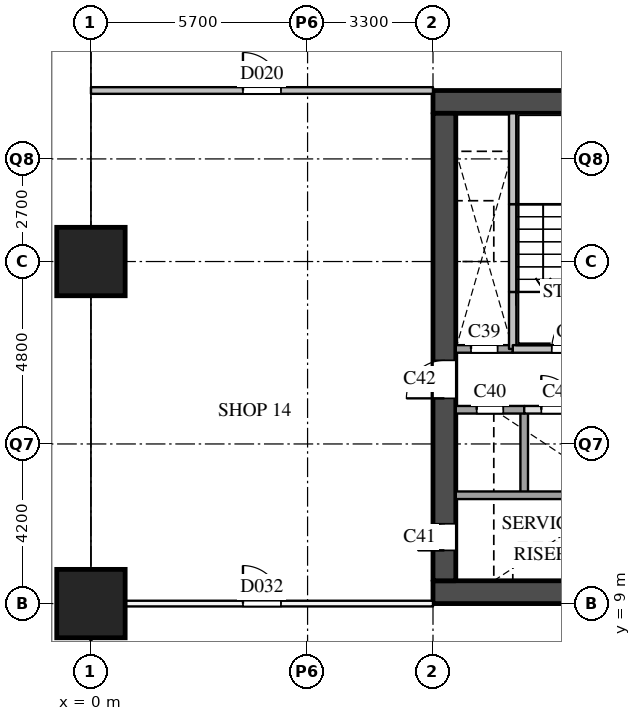
"""IFC4 building model, lengths in metres.
Left out: names, types, materials, properties, quantities, classifications, styles, units other than length and angle.
Written with IfcOpenShell. Run it as: python <this file> out.ifc"""

import sys

from ifc_helpers import new_model, si_unit, direction, frame, frame_2d, origin, origin_2d, place, context, subcontext, project, spatial, rectangle, extrude, element, fill, save


model = new_model("IFC4")
c1 = context("Model", 3, precision=1e-05, world=origin(), true_north=direction((0.0, 1.0)))
c2 = subcontext(c1, "Body", "Model", "MODEL_VIEW")
j1 = project(units=[si_unit("LENGTHUNIT", "METRE"), si_unit("PLANEANGLEUNIT", "RADIAN")], contexts=[c1])
p1 = place(None, origin())
s1 = spatial("IfcSite", under=j1, at=p1, CompositionType="ELEMENT")
p2 = place(p1, origin())
s2 = spatial("IfcBuilding", under=s1, at=p2, CompositionType="ELEMENT")
p3 = place(p2, frame((0.0, 0.0, 21.0)))
s3 = spatial("IfcBuildingStorey", under=s2, at=p3, CompositionType="ELEMENT", Elevation=21.0)
for number, where, z_axis, x_axis in (
    (1, (0.0, 9.0, 0.0), (0.0, 0.0, 1.0), (1.0, 0.0, 0.0)),
    (2, (0.0, 18.0, 0.0), (0.0, 0.0, 1.0), (1.0, 0.0, 0.0)),
):
    element("IfcColumn", number, at=place(p3, frame(where, z_axis=z_axis, x_axis=x_axis)), inside=s3, PredefinedType="COLUMN", context=c2, shape_type="SweptSolid", body=[
        extrude(rectangle(XDim=1.8, YDim=1.8, at=origin_2d()), origin(), (0.0, 0.0, 1.0), 5.0),
    ])
for number, where, z_axis, x_axis in (
    (3, (9.0, 9.3, 0.0), (0.0, 0.0, 1.0), (1.0, 0.0, 0.0)),
    (4, (9.0, 22.2, 0.0), (0.0, 0.0, 1.0), (1.0, 0.0, 0.0)),
):
    element("IfcWall", number, at=place(p3, frame(where, z_axis=z_axis, x_axis=x_axis)), inside=s3, PredefinedType="SHEAR", context=c2, shape_type="SweptSolid", body=[
        extrude(rectangle(XDim=9.0, YDim=0.6, at=frame_2d((4.5, 0.0))), origin(), (0.0, 0.0, 1.0), 4.55),
    ])
p4 = place(p3, frame((9.3, 9.6, 0.0), z_axis=(0.0, 0.0, 1.0), x_axis=(0.0, 1.0, 0.0)))
e5 = element("IfcWall", 5, at=p4, inside=s3, PredefinedType="SHEAR", context=c2, shape_type="SweptSolid", body=[
    extrude(rectangle(XDim=12.3, YDim=0.6, at=frame_2d((6.15, 0.0))), origin(), (0.0, 0.0, 1.0), 4.55),
])
p5 = place(p4, frame((0.8, 0.0, 0.0)))
e6 = element("IfcOpeningElement", 6, at=p5, cuts=e5, PredefinedType="OPENING", context=c2, shape_type="SweptSolid", body=[
    extrude(rectangle(XDim=0.7, YDim=2.1, at=frame_2d((0.35, 1.05))), frame((0.0, 0.31, 0.0), z_axis=(0.0, -1.0, 0.0), x_axis=(1.0, 0.0, 0.0)), (0.0, 0.0, 1.0), 0.62),
])
p6 = place(p4, frame((4.8, 0.0, 0.0)))
e7 = element("IfcOpeningElement", 7, at=p6, cuts=e5, PredefinedType="OPENING", context=c2, shape_type="SweptSolid", body=[
    extrude(rectangle(XDim=1.0, YDim=2.1, at=frame_2d((0.5, 1.05))), frame((0.0, 0.31, 0.0), z_axis=(0.0, -1.0, 0.0), x_axis=(1.0, 0.0, 0.0)), (0.0, 0.0, 1.0), 0.62),
])
p7 = place(p3, frame((11.1, 15.7, 0.0), z_axis=(0.0, 0.0, 1.0), x_axis=(0.0, 1.0, 0.0)))
e8 = element("IfcWall", 8, at=p7, inside=s3, PredefinedType="SOLIDWALL", context=c2, shape_type="SweptSolid", body=[
    extrude(rectangle(XDim=1.5, YDim=0.2, at=frame_2d((0.75, 0.0))), origin(), (0.0, 0.0, 1.0), 4.55),
])
p8 = place(p3, frame((11.1, 17.2, 0.0), z_axis=(0.0, 0.0, 1.0), x_axis=(0.0, 1.0, 0.0)))
e9 = element("IfcWall", 9, at=p8, inside=s3, PredefinedType="SOLIDWALL", context=c2, shape_type="SweptSolid", body=[
    extrude(rectangle(XDim=2.31, YDim=0.2, at=frame_2d((1.155, 0.0))), origin(), (0.0, 0.0, 1.0), 4.55),
])
p9 = place(p3, frame((11.1, 19.51, 0.0), z_axis=(0.0, 0.0, 1.0), x_axis=(0.0, 1.0, 0.0)))
e10 = element("IfcWall", 10, at=p9, inside=s3, PredefinedType="SOLIDWALL", context=c2, shape_type="SweptSolid", body=[
    extrude(rectangle(XDim=2.39, YDim=0.2, at=frame_2d((1.195, 0.0))), origin(), (0.0, 0.0, 1.0), 4.55),
])
p10 = place(p3, frame((11.4, 11.9, 0.0), z_axis=(0.0, 0.0, 1.0), x_axis=(0.0, 1.0, 0.0)))
e11 = element("IfcWall", 11, at=p10, inside=s3, PredefinedType="SOLIDWALL", context=c2, shape_type="SweptSolid", body=[
    extrude(rectangle(XDim=2.2, YDim=0.2, at=frame_2d((1.1, 0.0))), origin(), (0.0, 0.0, 1.0), 4.55),
])
p11 = place(p3, frame((9.6, 11.85, 0.0), z_axis=(0.0, 0.0, 1.0), x_axis=(1.0, 0.0, 0.0)))
e12 = element("IfcWall", 12, at=p11, inside=s3, PredefinedType="SOLIDWALL", context=c2, shape_type="SweptSolid", body=[
    extrude(rectangle(XDim=7.8, YDim=0.2, at=frame_2d((3.9, 0.0))), origin(), (0.0, 0.0, 1.0), 4.55),
])
p12 = place(p3, frame((11.4, 14.1, 0.0), z_axis=(0.0, 0.0, 1.0), x_axis=(1.0, 0.0, 0.0)))
e13 = element("IfcWall", 13, at=p12, inside=s3, PredefinedType="PARTITIONING", context=c2, shape_type="SweptSolid", body=[
    extrude(rectangle(XDim=6.0, YDim=0.2, at=frame_2d((3.0, 0.0))), origin(), (0.0, 0.0, 1.0), 4.55),
])
p13 = place(p12, frame((0.45, 0.0, 0.0)))
e14 = element("IfcOpeningElement", 14, at=p13, cuts=e13, PredefinedType="OPENING", context=c2, shape_type="SweptSolid", body=[
    extrude(rectangle(XDim=0.9, YDim=2.1, at=frame_2d((0.45, 1.05))), frame((0.0, 0.11, 0.0), z_axis=(0.0, -1.0, 0.0), x_axis=(1.0, 0.0, 0.0)), (0.0, 0.0, 1.0), 0.22),
])
p14 = place(p12, frame((3.45, 0.0, 0.0)))
e15 = element("IfcOpeningElement", 15, at=p14, cuts=e13, PredefinedType="OPENING", context=c2, shape_type="SweptSolid", body=[
    extrude(rectangle(XDim=0.9, YDim=2.1, at=frame_2d((0.45, 1.05))), frame((0.0, 0.11, 0.0), z_axis=(0.0, -1.0, 0.0), x_axis=(1.0, 0.0, 0.0)), (0.0, 0.0, 1.0), 0.22),
])
p15 = place(p3, frame((9.6, 14.1, 0.0), z_axis=(0.0, 0.0, 1.0), x_axis=(1.0, 0.0, 0.0)))
e16 = element("IfcWall", 16, at=p15, inside=s3, PredefinedType="SOLIDWALL", context=c2, shape_type="SweptSolid", body=[
    extrude(rectangle(XDim=1.8, YDim=0.2, at=frame_2d((0.9, 0.0))), origin(), (0.0, 0.0, 1.0), 4.55),
])
p16 = place(p15, frame((0.55, 0.0, 0.0)))
e17 = element("IfcOpeningElement", 17, at=p16, cuts=e16, PredefinedType="OPENING", context=c2, shape_type="SweptSolid", body=[
    extrude(rectangle(XDim=0.7, YDim=2.1, at=frame_2d((0.35, 1.05))), frame((0.0, 0.11, 0.0), z_axis=(0.0, -1.0, 0.0), x_axis=(1.0, 0.0, 0.0)), (0.0, 0.0, 1.0), 0.22),
])
p17 = place(p3, frame((9.6, 15.7, 0.0), z_axis=(0.0, 0.0, 1.0), x_axis=(1.0, 0.0, 0.0)))
e18 = element("IfcWall", 18, at=p17, inside=s3, PredefinedType="SOLIDWALL", context=c2, shape_type="SweptSolid", body=[
    extrude(rectangle(XDim=1.5, YDim=0.2, at=frame_2d((0.75, 0.0))), origin(), (0.0, 0.0, 1.0), 4.55),
])
p18 = place(p17, frame((0.4, 0.0, 0.0)))
e19 = element("IfcOpeningElement", 19, at=p18, cuts=e18, PredefinedType="OPENING", context=c2, shape_type="SweptSolid", body=[
    extrude(rectangle(XDim=0.7, YDim=2.1, at=frame_2d((0.35, 1.05))), frame((0.0, 0.11, 0.0), z_axis=(0.0, -1.0, 0.0), x_axis=(1.0, 0.0, 0.0)), (0.0, 0.0, 1.0), 0.22),
])
p19 = place(p3, frame((11.1, 15.7, 0.0), z_axis=(0.0, 0.0, 1.0), x_axis=(1.0, 0.0, 0.0)))
e20 = element("IfcWall", 20, at=p19, inside=s3, PredefinedType="SOLIDWALL", context=c2, shape_type="SweptSolid", body=[
    extrude(rectangle(XDim=3.05, YDim=0.2, at=frame_2d((1.525, 0.0))), origin(), (0.0, 0.0, 1.0), 4.55),
])
p20 = place(p19, frame((1.025, 0.0, 0.0)))
e21 = element("IfcOpeningElement", 21, at=p20, cuts=e20, PredefinedType="OPENING", context=c2, shape_type="SweptSolid", body=[
    extrude(rectangle(XDim=1.1, YDim=2.1, at=frame_2d((0.55, 1.05))), frame((0.0, 0.11, 0.0), z_axis=(0.0, -1.0, 0.0), x_axis=(1.0, 0.0, 0.0)), (0.0, 0.0, 1.0), 0.22),
])
p21 = place(p3, frame((0.0, 22.5, 0.0), z_axis=(0.0, 0.0, 1.0), x_axis=(1.0, 0.0, 0.0)))
e22 = element("IfcWall", 22, at=p21, inside=s3, PredefinedType="PARTITIONING", context=c2, shape_type="SweptSolid", body=[
    extrude(rectangle(XDim=9.0, YDim=0.175, at=frame_2d((4.5, 0.0))), origin(), (0.0, 0.0, 1.0), 3.55),
])
p22 = place(p21, frame((4.0, 0.0, 0.0)))
e23 = element("IfcOpeningElement", 23, at=p22, cuts=e22, PredefinedType="OPENING", context=c2, shape_type="SweptSolid", body=[
    extrude(rectangle(XDim=1.0, YDim=2.1, at=frame_2d((0.5, 1.05))), frame((0.0, 0.097, 0.0), z_axis=(0.0, -1.0, 0.0), x_axis=(1.0, 0.0, 0.0)), (0.0, 0.0, 1.0), 0.195),
])
p23 = place(p3, frame((0.0, 9.0, 0.0), z_axis=(0.0, 0.0, 1.0), x_axis=(1.0, 0.0, 0.0)))
e24 = element("IfcWall", 24, at=p23, inside=s3, PredefinedType="PARTITIONING", context=c2, shape_type="SweptSolid", body=[
    extrude(rectangle(XDim=9.0, YDim=0.15, at=frame_2d((4.5, 0.0))), origin(), (0.0, 0.0, 1.0), 4.55),
])
p24 = place(p23, frame((4.0, 0.0, 0.0)))
e25 = element("IfcOpeningElement", 25, at=p24, cuts=e24, PredefinedType="OPENING", context=c2, shape_type="SweptSolid", body=[
    extrude(rectangle(XDim=1.0, YDim=2.1, at=frame_2d((0.5, 1.05))), frame((0.0, 0.085, 0.0), z_axis=(0.0, -1.0, 0.0), x_axis=(1.0, 0.0, 0.0)), (0.0, 0.0, 1.0), 0.17),
])
p25 = place(p20, origin())
e26 = element("IfcDoor", 26, at=p25, inside=s3, OperationType="SINGLE_SWING_RIGHT", PredefinedType="DOOR", context=c2, shape_type="SweptSolid", body=[
    extrude(rectangle(XDim=1.1, YDim=2.1, at=frame_2d((0.55, 1.05))), frame((0.0, 0.025, 0.0), z_axis=(0.0, -1.0, 0.0), x_axis=(1.0, 0.0, 0.0)), (0.0, 0.0, 1.0), 0.05),
])
fill(e21, e26)
p26 = place(p18, origin())
e27 = element("IfcDoor", 27, at=p26, inside=s3, OperationType="SINGLE_SWING_LEFT", PredefinedType="DOOR", context=c2, shape_type="SweptSolid", body=[
    extrude(rectangle(XDim=0.7, YDim=2.1, at=frame_2d((0.35, 1.05))), frame((0.0, 0.025, 0.0), z_axis=(0.0, -1.0, 0.0), x_axis=(1.0, 0.0, 0.0)), (0.0, 0.0, 1.0), 0.05),
])
fill(e19, e27)
p27 = place(p16, origin())
e28 = element("IfcDoor", 28, at=p27, inside=s3, OperationType="SINGLE_SWING_LEFT", PredefinedType="DOOR", context=c2, shape_type="SweptSolid", body=[
    extrude(rectangle(XDim=0.7, YDim=2.1, at=frame_2d((0.35, 1.05))), frame((0.0, 0.025, 0.0), z_axis=(0.0, -1.0, 0.0), x_axis=(1.0, 0.0, 0.0)), (0.0, 0.0, 1.0), 0.05),
])
fill(e17, e28)
p28 = place(p5, origin())
e29 = element("IfcDoor", 29, at=p28, inside=s3, OperationType="SINGLE_SWING_LEFT", PredefinedType="DOOR", context=c2, shape_type="SweptSolid", body=[
    extrude(rectangle(XDim=0.7, YDim=2.1, at=frame_2d((0.35, 1.05))), frame((0.0, 0.025, 0.0), z_axis=(0.0, -1.0, 0.0), x_axis=(1.0, 0.0, 0.0)), (0.0, 0.0, 1.0), 0.05),
])
fill(e6, e29)
p29 = place(p6, origin())
e30 = element("IfcDoor", 30, at=p29, inside=s3, OperationType="SINGLE_SWING_LEFT", PredefinedType="DOOR", context=c2, shape_type="SweptSolid", body=[
    extrude(rectangle(XDim=1.0, YDim=2.1, at=frame_2d((0.5, 1.05))), frame((0.0, 0.025, 0.0), z_axis=(0.0, -1.0, 0.0), x_axis=(1.0, 0.0, 0.0)), (0.0, 0.0, 1.0), 0.05),
])
fill(e7, e30)
p30 = place(p13, origin())
e31 = element("IfcDoor", 31, at=p30, inside=s3, OperationType="SINGLE_SWING_LEFT", PredefinedType="DOOR", context=c2, shape_type="SweptSolid", body=[
    extrude(rectangle(XDim=0.9, YDim=2.1, at=frame_2d((0.45, 1.05))), frame((0.0, 0.025, 0.0), z_axis=(0.0, -1.0, 0.0), x_axis=(1.0, 0.0, 0.0)), (0.0, 0.0, 1.0), 0.05),
])
fill(e14, e31)
p31 = place(p22, origin())
e32 = element("IfcDoor", 32, at=p31, inside=s3, OperationType="SINGLE_SWING_LEFT", PredefinedType="DOOR", context=c2, shape_type="SweptSolid", body=[
    extrude(rectangle(XDim=1.0, YDim=2.1, at=frame_2d((0.5, 1.05))), frame((0.0, 0.025, 0.0), z_axis=(0.0, -1.0, 0.0), x_axis=(1.0, 0.0, 0.0)), (0.0, 0.0, 1.0), 0.05),
])
fill(e23, e32)
p32 = place(p24, origin())
e33 = element("IfcDoor", 33, at=p32, inside=s3, OperationType="SINGLE_SWING_LEFT", PredefinedType="DOOR", context=c2, shape_type="SweptSolid", body=[
    extrude(rectangle(XDim=1.0, YDim=2.1, at=frame_2d((0.5, 1.05))), frame((0.0, 0.025, 0.0), z_axis=(0.0, -1.0, 0.0), x_axis=(1.0, 0.0, 0.0)), (0.0, 0.0, 1.0), 0.05),
])
fill(e25, e33)
save(model, sys.argv[1])
